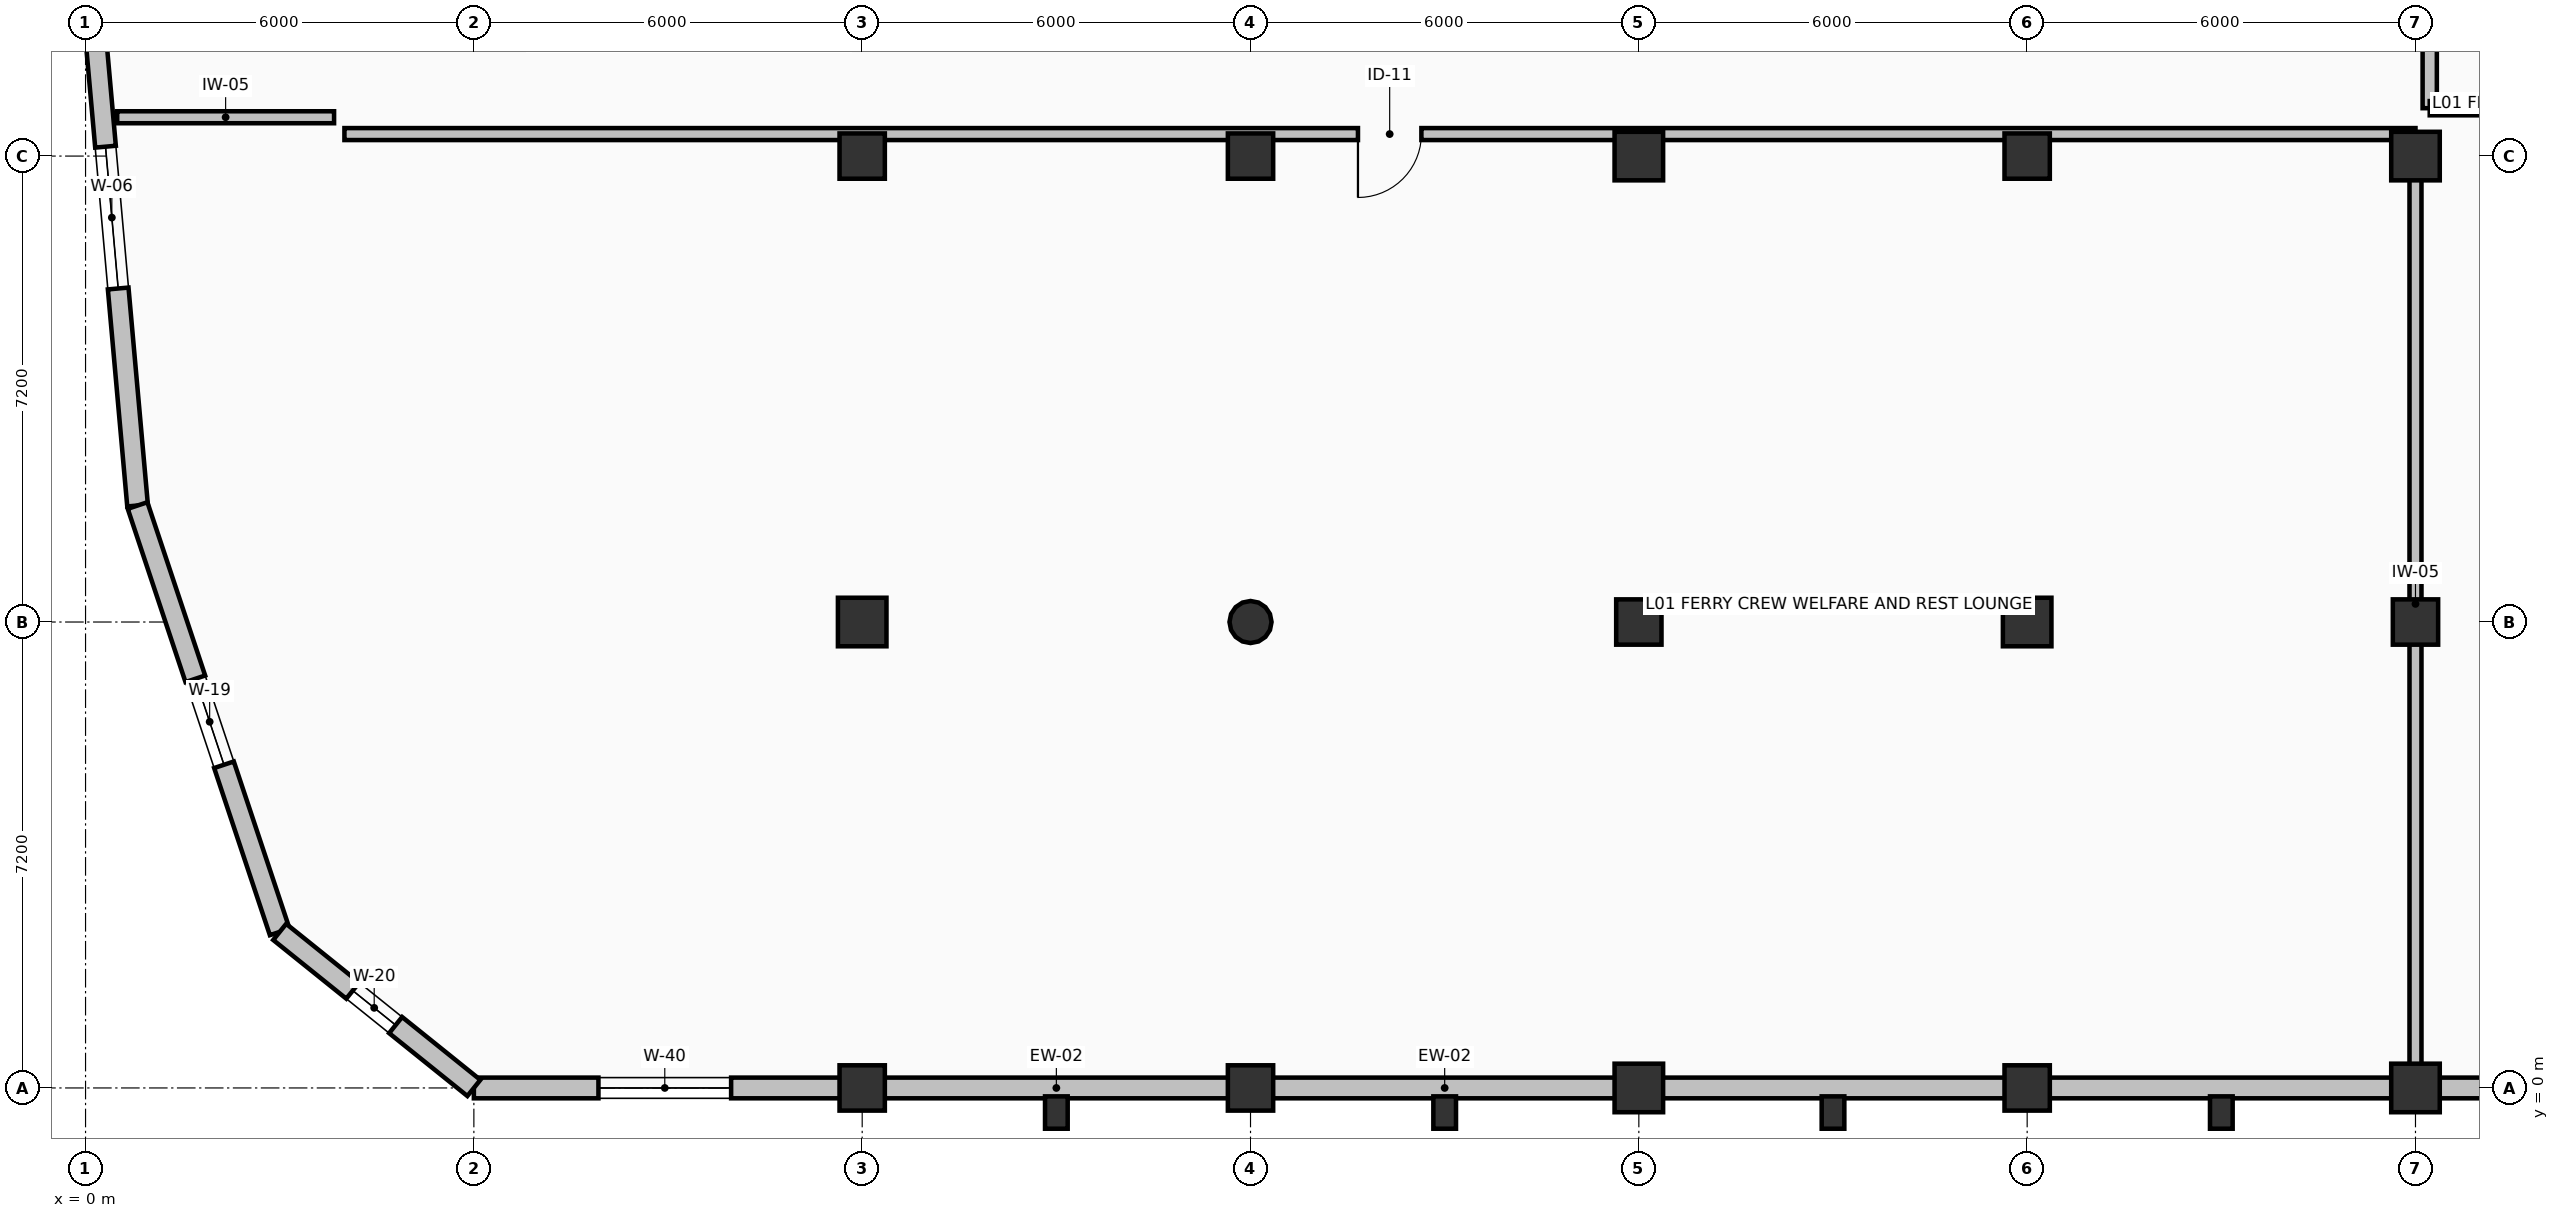
"""IFC4 building model, lengths in metres.
Left out: names, types, materials, properties, quantities, classifications, styles, units other than length and angle.
Written with IfcOpenShell. Run it as: python <this file> out.ifc"""

import sys

from ifc_helpers import new_model, si_unit, direction, frame, frame_2d, origin, origin_2d, place, context, subcontext, project, spatial, rectangle, circle, extrude, element, fill, save


model = new_model("IFC4")
c1 = context("Model", 3, precision=1e-05, world=origin(), true_north=direction((0.0, 1.0)))
c2 = subcontext(c1, "Body", "Model", "MODEL_VIEW")
j1 = project(units=[si_unit("LENGTHUNIT", "METRE"), si_unit("PLANEANGLEUNIT", "RADIAN")], contexts=[c1])
p1 = place(None, origin())
s1 = spatial("IfcSite", under=j1, at=p1, CompositionType="ELEMENT")
p2 = place(p1, origin())
s2 = spatial("IfcBuilding", under=s1, at=p2, CompositionType="ELEMENT")
p3 = place(p2, frame((0.0, 0.0, 5.76)))
s3 = spatial("IfcBuildingStorey", under=s2, at=p3, CompositionType="ELEMENT", Elevation=5.76)
p4 = place(p3, frame((12.0, 0.0, 0.0), z_axis=(0.0, 0.0, 1.0), x_axis=(1.0, 0.0, 0.0)))
e1 = element("IfcColumn", 1, at=p4, inside=s3, PredefinedType="COLUMN", context=c2, shape_type="SweptSolid", body=[
    extrude(rectangle(XDim=0.7, YDim=0.7, at=origin_2d()), origin(), (0.0, 0.0, 1.0), 4.08),
])
p5 = place(p3, frame((12.0, 7.2, 0.0), z_axis=(0.0, 0.0, 1.0), x_axis=(1.0, 0.0, 0.0)))
e2 = element("IfcColumn", 2, at=p5, inside=s3, PredefinedType="COLUMN", context=c2, shape_type="SweptSolid", body=[
    extrude(rectangle(XDim=0.75, YDim=0.75, at=origin_2d()), origin(), (0.0, 0.0, 1.0), 4.08),
])
for number, where, z_axis, x_axis in (
    (3, (12.0, 14.4, 0.0), (0.0, 0.0, 1.0), (1.0, 0.0, 0.0)),
    (4, (18.0, 0.0, 0.0), (0.0, 0.0, 1.0), (1.0, 0.0, 0.0)),
):
    element("IfcColumn", number, at=place(p3, frame(where, z_axis=z_axis, x_axis=x_axis)), inside=s3, PredefinedType="COLUMN", context=c2, shape_type="SweptSolid", body=[
        extrude(rectangle(XDim=0.7, YDim=0.7, at=origin_2d()), origin(), (0.0, 0.0, 1.0), 4.08),
    ])
p6 = place(p3, frame((18.0, 7.2, 0.0), z_axis=(0.0, 0.0, 1.0), x_axis=(1.0, 0.0, 0.0)))
e5 = element("IfcColumn", 5, at=p6, inside=s3, PredefinedType="COLUMN", context=c2, shape_type="SweptSolid", body=[
    extrude(circle(Radius=0.325, at=origin_2d()), origin(), (0.0, 0.0, 1.0), 4.08),
])
p7 = place(p3, frame((18.0, 14.4, 0.0), z_axis=(0.0, 0.0, 1.0), x_axis=(1.0, 0.0, 0.0)))
e6 = element("IfcColumn", 6, at=p7, inside=s3, PredefinedType="COLUMN", context=c2, shape_type="SweptSolid", body=[
    extrude(rectangle(XDim=0.7, YDim=0.7, at=origin_2d()), origin(), (0.0, 0.0, 1.0), 4.08),
])
p8 = place(p3, frame((24.0, 0.0, 0.0), z_axis=(0.0, 0.0, 1.0), x_axis=(1.0, 0.0, 0.0)))
e7 = element("IfcColumn", 7, at=p8, inside=s3, PredefinedType="COLUMN", context=c2, shape_type="SweptSolid", body=[
    extrude(rectangle(XDim=0.75, YDim=0.75, at=origin_2d()), origin(), (0.0, 0.0, 1.0), 4.08),
])
p9 = place(p3, frame((24.0, 7.2, 0.0), z_axis=(0.0, 0.0, 1.0), x_axis=(1.0, 0.0, 0.0)))
e8 = element("IfcColumn", 8, at=p9, inside=s3, PredefinedType="COLUMN", context=c2, shape_type="SweptSolid", body=[
    extrude(rectangle(XDim=0.7, YDim=0.7, at=origin_2d()), origin(), (0.0, 0.0, 1.0), 4.08),
])
p10 = place(p3, frame((24.0, 14.4, 0.0), z_axis=(0.0, 0.0, 1.0), x_axis=(1.0, 0.0, 0.0)))
e9 = element("IfcColumn", 9, at=p10, inside=s3, PredefinedType="COLUMN", context=c2, shape_type="SweptSolid", body=[
    extrude(rectangle(XDim=0.75, YDim=0.75, at=origin_2d()), origin(), (0.0, 0.0, 1.0), 4.08),
])
p11 = place(p3, frame((30.0, 0.0, 0.0), z_axis=(0.0, 0.0, 1.0), x_axis=(1.0, 0.0, 0.0)))
e10 = element("IfcColumn", 10, at=p11, inside=s3, PredefinedType="COLUMN", context=c2, shape_type="SweptSolid", body=[
    extrude(rectangle(XDim=0.7, YDim=0.7, at=origin_2d()), origin(), (0.0, 0.0, 1.0), 4.08),
])
p12 = place(p3, frame((30.0, 7.2, 0.0), z_axis=(0.0, 0.0, 1.0), x_axis=(1.0, 0.0, 0.0)))
e11 = element("IfcColumn", 11, at=p12, inside=s3, PredefinedType="COLUMN", context=c2, shape_type="SweptSolid", body=[
    extrude(rectangle(XDim=0.75, YDim=0.75, at=origin_2d()), origin(), (0.0, 0.0, 1.0), 4.08),
])
p13 = place(p3, frame((30.0, 14.4, 0.0), z_axis=(0.0, 0.0, 1.0), x_axis=(1.0, 0.0, 0.0)))
e12 = element("IfcColumn", 12, at=p13, inside=s3, PredefinedType="COLUMN", context=c2, shape_type="SweptSolid", body=[
    extrude(rectangle(XDim=0.7, YDim=0.7, at=origin_2d()), origin(), (0.0, 0.0, 1.0), 4.08),
])
p14 = place(p3, frame((36.0, 0.0, 0.0), z_axis=(0.0, 0.0, 1.0), x_axis=(1.0, 0.0, 0.0)))
e13 = element("IfcColumn", 13, at=p14, inside=s3, PredefinedType="COLUMN", context=c2, shape_type="SweptSolid", body=[
    extrude(rectangle(XDim=0.75, YDim=0.75, at=origin_2d()), origin(), (0.0, 0.0, 1.0), 4.08),
])
p15 = place(p3, frame((36.0, 7.2, 0.0), z_axis=(0.0, 0.0, 1.0), x_axis=(1.0, 0.0, 0.0)))
e14 = element("IfcColumn", 14, at=p15, inside=s3, PredefinedType="COLUMN", context=c2, shape_type="SweptSolid", body=[
    extrude(rectangle(XDim=0.7, YDim=0.7, at=origin_2d()), origin(), (0.0, 0.0, 1.0), 4.08),
])
p16 = place(p3, frame((36.0, 14.4, 0.0), z_axis=(0.0, 0.0, 1.0), x_axis=(1.0, 0.0, 0.0)))
e15 = element("IfcColumn", 15, at=p16, inside=s3, PredefinedType="COLUMN", context=c2, shape_type="SweptSolid", body=[
    extrude(rectangle(XDim=0.75, YDim=0.75, at=origin_2d()), origin(), (0.0, 0.0, 1.0), 4.08),
])
for number, where, z_axis, x_axis in (
    (16, (15.0, -0.38, 0.0), (0.0, 0.0, 1.0), (1.0, 0.0, 0.0)),
    (17, (21.0, -0.38, 0.0), (0.0, 0.0, 1.0), (1.0, 0.0, 0.0)),
    (18, (27.0, -0.38, 0.0), (0.0, 0.0, 1.0), (1.0, 0.0, 0.0)),
    (19, (33.0, -0.38, 0.0), (0.0, 0.0, 1.0), (1.0, 0.0, 0.0)),
):
    element("IfcColumn", number, at=place(p3, frame(where, z_axis=z_axis, x_axis=x_axis)), inside=s3, PredefinedType="PILASTER", context=c2, shape_type="SweptSolid", body=[
        extrude(rectangle(XDim=0.35, YDim=0.5, at=origin_2d()), origin(), (0.0, 0.0, 1.0), 4.08),
    ])
p17 = place(p3, frame((6.0, 0.0, 0.0), z_axis=(0.0, 0.0, 1.0), x_axis=(1.0, 0.0, 0.0)))
e20 = element("IfcWall", 20, at=p17, inside=s3, PredefinedType="SOLIDWALL", context=c2, shape_type="SweptSolid", body=[
    extrude(rectangle(XDim=6.0, YDim=0.32, at=frame_2d((3.0, 0.0))), origin(), (0.0, 0.0, 1.0), 3.78),
])
p18 = place(p17, frame((1.925, 0.0, 0.95)))
e21 = element("IfcOpeningElement", 21, at=p18, cuts=e20, PredefinedType="OPENING", context=c2, shape_type="SweptSolid", body=[
    extrude(rectangle(XDim=2.05, YDim=1.4, at=frame_2d((1.025, 0.7))), frame((0.0, 0.17, 0.0), z_axis=(0.0, -1.0, 0.0), x_axis=(1.0, 0.0, 0.0)), (0.0, 0.0, 1.0), 0.34),
])
for number, where, z_axis, x_axis in (
    (22, (12.0, 0.0, 0.0), (0.0, 0.0, 1.0), (1.0, 0.0, 0.0)),
    (23, (18.0, 0.0, 0.0), (0.0, 0.0, 1.0), (1.0, 0.0, 0.0)),
    (24, (24.0, 0.0, 0.0), (0.0, 0.0, 1.0), (1.0, 0.0, 0.0)),
    (25, (30.0, 0.0, 0.0), (0.0, 0.0, 1.0), (1.0, 0.0, 0.0)),
    (26, (36.0, 0.0, 0.0), (0.0, 0.0, 1.0), (1.0, 0.0, 0.0)),
):
    element("IfcWall", number, at=place(p3, frame(where, z_axis=z_axis, x_axis=x_axis)), inside=s3, PredefinedType="SOLIDWALL", context=c2, shape_type="SweptSolid", body=[
        extrude(rectangle(XDim=6.0, YDim=0.32, at=frame_2d((3.0, 0.0))), origin(), (0.0, 0.0, 1.0), 3.11),
    ])
p19 = place(p3, frame((0.0, 18.0, 0.0), z_axis=(0.0, 0.0, 1.0), x_axis=(0.088947255406, -0.996036337568, 0.0)))
e27 = element("IfcWall", 27, at=p19, inside=s3, PredefinedType="SOLIDWALL", context=c2, shape_type="SweptSolid", body=[
    extrude(rectangle(XDim=9.036, YDim=0.32, at=frame_2d((4.518, 0.0))), origin(), (0.0, 0.0, 1.0), 3.78),
])
p20 = place(p19, frame((3.469, 0.0, 0.95)))
e28 = element("IfcOpeningElement", 28, at=p20, cuts=e27, PredefinedType="OPENING", context=c2, shape_type="SweptSolid", body=[
    extrude(rectangle(XDim=2.2, YDim=1.5, at=frame_2d((1.1, 0.75))), frame((0.0, 0.17, 0.0), z_axis=(0.0, -1.0, 0.0), x_axis=(1.0, 0.0, 0.0)), (0.0, 0.0, 1.0), 0.34),
])
p21 = place(p3, frame((0.804, 9.0, 0.0), z_axis=(0.0, 0.0, 1.0), x_axis=(0.31624885857, -0.948676266939, 0.0)))
e29 = element("IfcWall", 29, at=p21, inside=s3, PredefinedType="SOLIDWALL", context=c2, shape_type="SweptSolid", body=[
    extrude(rectangle(XDim=6.945, YDim=0.32, at=frame_2d((3.472, 0.0))), origin(), (0.0, 0.0, 1.0), 3.78),
])
p22 = place(p21, frame((2.823, 0.0, 1.15)))
e30 = element("IfcOpeningElement", 30, at=p22, cuts=e29, PredefinedType="OPENING", context=c2, shape_type="SweptSolid", body=[
    extrude(rectangle(XDim=1.4, YDim=1.4, at=frame_2d((0.7, 0.7))), frame((0.0, 0.17, 0.0), z_axis=(0.0, -1.0, 0.0), x_axis=(1.0, 0.0, 0.0)), (0.0, 0.0, 1.0), 0.34),
])
p23 = place(p3, frame((3.0, 2.412, 0.0), z_axis=(0.0, 0.0, 1.0), x_axis=(0.779393889884, -0.626534248395, 0.0)))
e31 = element("IfcWall", 31, at=p23, inside=s3, PredefinedType="SOLIDWALL", context=c2, shape_type="SweptSolid", body=[
    extrude(rectangle(XDim=3.849, YDim=0.32, at=frame_2d((1.925, 0.0))), origin(), (0.0, 0.0, 1.0), 3.78),
])
p24 = place(p23, frame((1.448, 0.0, 1.15)))
e32 = element("IfcOpeningElement", 32, at=p24, cuts=e31, PredefinedType="OPENING", context=c2, shape_type="SweptSolid", body=[
    extrude(rectangle(XDim=0.85, YDim=0.85, at=frame_2d((0.425, 0.425))), frame((0.0, 0.17, 0.0), z_axis=(0.0, -1.0, 0.0), x_axis=(1.0, 0.0, 0.0)), (0.0, 0.0, 1.0), 0.34),
])
p25 = place(p3, frame((36.22, 18.25, 0.0), z_axis=(0.0, 0.0, 1.0), x_axis=(0.0, -1.0, 0.0)))
e33 = element("IfcWall", 33, at=p25, inside=s3, PredefinedType="SOLIDWALL", context=c2, shape_type="SweptSolid", body=[
    extrude(rectangle(XDim=3.11, YDim=0.22, at=frame_2d((1.555, 0.0))), origin(), (0.0, 0.0, 1.0), 3.06),
])
p26 = place(p25, frame((1.005, 0.0, 0.0)))
e34 = element("IfcOpeningElement", 34, at=p26, cuts=e33, PredefinedType="OPENING", context=c2, shape_type="SweptSolid", body=[
    extrude(rectangle(XDim=1.1, YDim=2.15, at=frame_2d((0.55, 1.075))), frame((0.0, 0.12, 0.0), z_axis=(0.0, -1.0, 0.0), x_axis=(1.0, 0.0, 0.0)), (0.0, 0.0, 1.0), 0.24),
])
p27 = place(p3, frame((36.22, 15.14, 0.0), z_axis=(0.0, 0.0, 1.0), x_axis=(1.0, 0.0, 0.0)))
e35 = element("IfcWall", 35, at=p27, inside=s3, PredefinedType="SOLIDWALL", context=c2, shape_type="SweptSolid", body=[
    extrude(rectangle(XDim=3.42, YDim=0.22, at=frame_2d((1.71, 0.0))), origin(), (0.0, 0.0, 1.0), 3.82),
])
p28 = place(p3, frame((36.0, 0.22, 0.0), z_axis=(0.0, 0.0, 1.0), x_axis=(0.0, 1.0, 0.0)))
e36 = element("IfcWall", 36, at=p28, inside=s3, PredefinedType="PARTITIONING", context=c2, shape_type="SweptSolid", body=[
    extrude(rectangle(XDim=14.52, YDim=0.185, at=frame_2d((7.26, 0.0))), origin(), (0.0, 0.0, 1.0), 2.86),
])
p29 = place(p3, frame((36.0, 14.74, 0.0), z_axis=(0.0, 0.0, 1.0), x_axis=(-1.0, 0.0, 0.0)))
e37 = element("IfcWall", 37, at=p29, inside=s3, PredefinedType="PARTITIONING", context=c2, shape_type="SweptSolid", body=[
    extrude(rectangle(XDim=32.0, YDim=0.185, at=frame_2d((16.0, 0.0))), origin(), (0.0, 0.0, 1.0), 3.01),
])
p30 = place(p29, frame((15.36, 0.0, 0.0)))
e38 = element("IfcOpeningElement", 38, at=p30, cuts=e37, PredefinedType="OPENING", context=c2, shape_type="SweptSolid", body=[
    extrude(rectangle(XDim=0.98, YDim=2.12, at=frame_2d((0.49, 1.06))), frame((0.0, 0.103, 0.0), z_axis=(0.0, -1.0, 0.0), x_axis=(1.0, 0.0, 0.0)), (0.0, 0.0, 1.0), 0.205),
])
p31 = place(p3, frame((3.84, 15.0, 0.0), z_axis=(0.0, 0.0, 1.0), x_axis=(-1.0, 0.0, 0.0)))
e39 = element("IfcWall", 39, at=p31, inside=s3, PredefinedType="PARTITIONING", context=c2, shape_type="SweptSolid", body=[
    extrude(rectangle(XDim=3.351, YDim=0.185, at=frame_2d((1.676, 0.0))), origin(), (0.0, 0.0, 1.0), 3.44),
])
p32 = place(p18, origin())
e40 = element("IfcWindow", 40, at=p32, inside=s3, PartitioningType="SINGLE_PANEL", PredefinedType="WINDOW", context=c2, shape_type="SweptSolid", body=[
    extrude(rectangle(XDim=2.05, YDim=1.4, at=frame_2d((1.025, 0.7))), frame((0.0, 0.03, 0.0), z_axis=(0.0, -1.0, 0.0), x_axis=(1.0, 0.0, 0.0)), (0.0, 0.0, 1.0), 0.06),
])
fill(e21, e40)
p33 = place(p20, origin())
e41 = element("IfcWindow", 41, at=p33, inside=s3, PartitioningType="SINGLE_PANEL", PredefinedType="WINDOW", context=c2, shape_type="SweptSolid", body=[
    extrude(rectangle(XDim=2.2, YDim=1.5, at=frame_2d((1.1, 0.75))), frame((0.0, 0.03, 0.0), z_axis=(0.0, -1.0, 0.0), x_axis=(1.0, 0.0, 0.0)), (0.0, 0.0, 1.0), 0.06),
])
fill(e28, e41)
p34 = place(p22, origin())
e42 = element("IfcWindow", 42, at=p34, inside=s3, PartitioningType="SINGLE_PANEL", PredefinedType="WINDOW", context=c2, shape_type="SweptSolid", body=[
    extrude(rectangle(XDim=1.4, YDim=1.4, at=frame_2d((0.7, 0.7))), frame((0.0, 0.03, 0.0), z_axis=(0.0, -1.0, 0.0), x_axis=(1.0, 0.0, 0.0)), (0.0, 0.0, 1.0), 0.06),
])
fill(e30, e42)
p35 = place(p24, origin())
e43 = element("IfcWindow", 43, at=p35, inside=s3, PartitioningType="SINGLE_PANEL", PredefinedType="WINDOW", context=c2, shape_type="SweptSolid", body=[
    extrude(rectangle(XDim=0.85, YDim=0.85, at=frame_2d((0.425, 0.425))), frame((0.0, 0.03, 0.0), z_axis=(0.0, -1.0, 0.0), x_axis=(1.0, 0.0, 0.0)), (0.0, 0.0, 1.0), 0.06),
])
fill(e32, e43)
p36 = place(p30, origin())
e44 = element("IfcDoor", 44, at=p36, inside=s3, OperationType="SINGLE_SWING_RIGHT", PredefinedType="DOOR", context=c2, shape_type="SweptSolid", body=[
    extrude(rectangle(XDim=0.98, YDim=2.12, at=frame_2d((0.49, 1.06))), frame((0.0, 0.025, 0.0), z_axis=(0.0, -1.0, 0.0), x_axis=(1.0, 0.0, 0.0)), (0.0, 0.0, 1.0), 0.05),
])
fill(e38, e44)
save(model, sys.argv[1])
